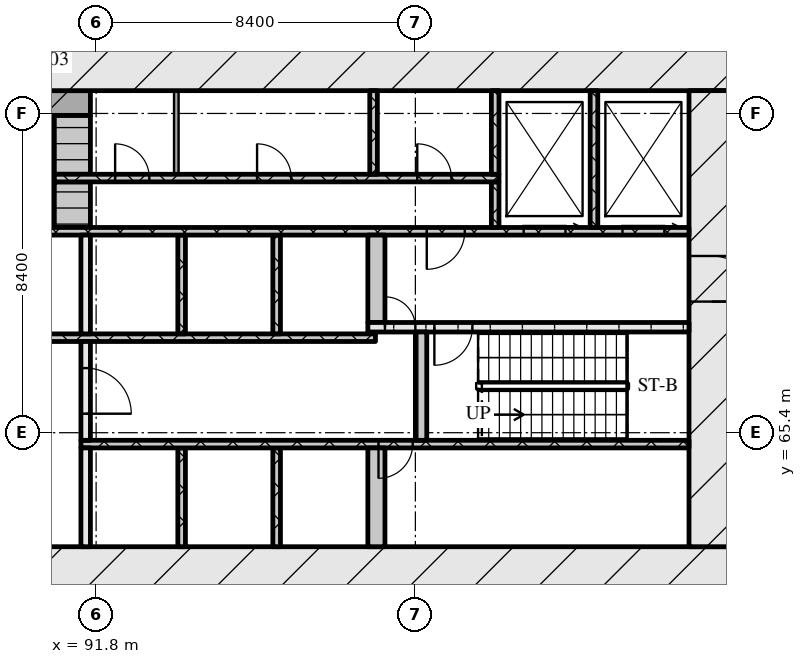
"""IFC4 building model, lengths in metres.
Left out: names, types, materials, properties, quantities, classifications, styles, units other than length and angle.
Written with IfcOpenShell. Run it as: python <this file> out.ifc"""

import sys

from ifc_helpers import new_model, si_unit, direction, frame, frame_2d, origin, place, context, subcontext, project, spatial, rectangle, extrude, element, fill, save


model = new_model("IFC4")
c1 = context("Model", 3, precision=1e-05, world=origin(), true_north=direction((0.0, 1.0)))
c2 = subcontext(c1, "Body", "Model", "MODEL_VIEW")
j1 = project(units=[si_unit("LENGTHUNIT", "METRE"), si_unit("PLANEANGLEUNIT", "RADIAN")], contexts=[c1])
p1 = place(None, origin())
s1 = spatial("IfcSite", under=j1, at=p1, CompositionType="ELEMENT")
p2 = place(p1, origin())
s2 = spatial("IfcBuilding", under=s1, at=p2, CompositionType="ELEMENT")
p3 = place(p2, frame((0.0, 0.0, 9.0)))
s3 = spatial("IfcBuildingStorey", under=s2, at=p3, CompositionType="ELEMENT", Elevation=9.0)
p4 = place(p3, frame((66.6, 61.8, 0.0), z_axis=(0.0, 0.0, 1.0), x_axis=(1.0, 0.0, 0.0)))
e1 = element("IfcWall", 1, at=p4, inside=s3, PredefinedType="SOLIDWALL", context=c2, shape_type="SweptSolid", body=[
    extrude(rectangle(XDim=42.0, YDim=1.2, at=frame_2d((21.0, 0.0))), origin(), (0.0, 0.0, 1.0), 5.1),
])
p5 = place(p4, frame((21.35, 0.0, 0.0)))
e2 = element("IfcOpeningElement", 2, at=p5, cuts=e1, PredefinedType="OPENING", context=c2, shape_type="SweptSolid", body=[
    extrude(rectangle(XDim=1.8, YDim=2.1, at=frame_2d((0.9, 1.05))), frame((0.0, 0.61, 0.0), z_axis=(0.0, -1.0, 0.0), x_axis=(1.0, 0.0, 0.0)), (0.0, 0.0, 1.0), 1.22),
])
p6 = place(p3, frame((66.6, 75.0, 0.0), z_axis=(0.0, 0.0, 1.0), x_axis=(1.0, 0.0, 0.0)))
e3 = element("IfcWall", 3, at=p6, inside=s3, PredefinedType="SOLIDWALL", context=c2, shape_type="SweptSolid", body=[
    extrude(rectangle(XDim=42.0, YDim=1.2, at=frame_2d((21.0, 0.0))), origin(), (0.0, 0.0, 1.0), 5.1),
])
p7 = place(p3, frame((108.0, 62.4, 0.0), z_axis=(0.0, 0.0, 1.0), x_axis=(0.0, 1.0, 0.0)))
e4 = element("IfcWall", 4, at=p7, inside=s3, PredefinedType="SOLIDWALL", context=c2, shape_type="SweptSolid", body=[
    extrude(rectangle(XDim=12.0, YDim=1.2, at=frame_2d((6.0, 0.0))), origin(), (0.0, 0.0, 1.0), 5.1),
])
p8 = place(p7, frame((6.45, 0.0, 0.0)))
e5 = element("IfcOpeningElement", 5, at=p8, cuts=e4, PredefinedType="OPENING", context=c2, shape_type="SweptSolid", body=[
    extrude(rectangle(XDim=1.2, YDim=2.1, at=frame_2d((0.6, 1.05))), frame((0.0, 0.61, 0.0), z_axis=(0.0, -1.0, 0.0), x_axis=(1.0, 0.0, 0.0)), (0.0, 0.0, 1.0), 1.22),
])
p9 = place(p3, frame((91.525, 62.4, 0.0), z_axis=(0.0, 0.0, 1.0), x_axis=(0.0, 1.0, 0.0)))
e6 = element("IfcWall", 6, at=p9, inside=s3, PredefinedType="SOLIDWALL", context=c2, shape_type="SweptSolid", body=[
    extrude(rectangle(XDim=2.6, YDim=0.25, at=frame_2d((1.3, 0.0))), origin(), (0.0, 0.0, 1.0), 5.1),
])
for number, where, z_axis, x_axis in (
    (7, (94.05, 62.4, 0.0), (0.0, 0.0, 1.0), (0.0, 1.0, 0.0)),
    (8, (96.55, 62.4, 0.0), (0.0, 0.0, 1.0), (0.0, 1.0, 0.0)),
):
    element("IfcWall", number, at=place(p3, frame(where, z_axis=z_axis, x_axis=x_axis)), inside=s3, PredefinedType="SOLIDWALL", context=c2, shape_type="SweptSolid", body=[
        extrude(rectangle(XDim=2.6, YDim=0.2, at=frame_2d((1.3, 0.0))), origin(), (0.0, 0.0, 1.0), 5.1),
    ])
p10 = place(p3, frame((99.175, 62.4, 0.0), z_axis=(0.0, 0.0, 1.0), x_axis=(0.0, 1.0, 0.0)))
e9 = element("IfcWall", 9, at=p10, inside=s3, PredefinedType="SOLIDWALL", context=c2, shape_type="SweptSolid", body=[
    extrude(rectangle(XDim=2.6, YDim=0.45, at=frame_2d((1.3, 0.0))), origin(), (0.0, 0.0, 1.0), 5.1),
])
p11 = place(p3, frame((91.4, 65.1, 0.0), z_axis=(0.0, 0.0, 1.0), x_axis=(1.0, 0.0, 0.0)))
e10 = element("IfcWall", 10, at=p11, inside=s3, PredefinedType="SOLIDWALL", context=c2, shape_type="SweptSolid", body=[
    extrude(rectangle(XDim=16.0, YDim=0.2, at=frame_2d((8.0, 0.0))), origin(), (0.0, 0.0, 1.0), 5.1),
])
p12 = place(p11, frame((7.83, 0.0, 0.0)))
e11 = element("IfcOpeningElement", 11, at=p12, cuts=e10, PredefinedType="OPENING", context=c2, shape_type="SweptSolid", body=[
    extrude(rectangle(XDim=0.9, YDim=2.1, at=frame_2d((0.45, 1.05))), frame((0.0, 0.11, 0.0), z_axis=(0.0, -1.0, 0.0), x_axis=(1.0, 0.0, 0.0)), (0.0, 0.0, 1.0), 0.22),
])
p13 = place(p3, frame((91.525, 65.2, 0.0), z_axis=(0.0, 0.0, 1.0), x_axis=(0.0, 1.0, 0.0)))
e12 = element("IfcWall", 12, at=p13, inside=s3, PredefinedType="SOLIDWALL", context=c2, shape_type="SweptSolid", body=[
    extrude(rectangle(XDim=2.6, YDim=0.25, at=frame_2d((1.3, 0.0))), origin(), (0.0, 0.0, 1.0), 5.1),
])
p14 = place(p13, frame((0.7, 0.0, 0.0)))
e13 = element("IfcOpeningElement", 13, at=p14, cuts=e12, PredefinedType="OPENING", context=c2, shape_type="SweptSolid", body=[
    extrude(rectangle(XDim=1.2, YDim=2.1, at=frame_2d((0.6, 1.05))), frame((0.0, 0.135, 0.0), z_axis=(0.0, -1.0, 0.0), x_axis=(1.0, 0.0, 0.0)), (0.0, 0.0, 1.0), 0.27),
])
p15 = place(p3, frame((100.35, 65.2, 0.0), z_axis=(0.0, 0.0, 1.0), x_axis=(0.0, 1.0, 0.0)))
e14 = element("IfcWall", 14, at=p15, inside=s3, PredefinedType="SOLIDWALL", context=c2, shape_type="SweptSolid", body=[
    extrude(rectangle(XDim=2.85, YDim=0.3, at=frame_2d((1.425, 0.0))), origin(), (0.0, 0.0, 1.0), 5.1),
])
p16 = place(p3, frame((76.05, 67.9, 0.0), z_axis=(0.0, 0.0, 1.0), x_axis=(1.0, 0.0, 0.0)))
e15 = element("IfcWall", 15, at=p16, inside=s3, PredefinedType="SOLIDWALL", context=c2, shape_type="SweptSolid", body=[
    extrude(rectangle(XDim=23.1, YDim=0.2, at=frame_2d((11.55, 0.0))), origin(), (0.0, 0.0, 1.0), 5.1),
])
p17 = place(p16, frame((8.35, 0.0, 0.0)))
e16 = element("IfcOpeningElement", 16, at=p17, cuts=e15, PredefinedType="OPENING", context=c2, shape_type="SweptSolid", body=[
    extrude(rectangle(XDim=1.1, YDim=2.1, at=frame_2d((0.55, 1.05))), frame((0.0, 0.11, 0.0), z_axis=(0.0, -1.0, 0.0), x_axis=(1.0, 0.0, 0.0)), (0.0, 0.0, 1.0), 0.22),
])
p18 = place(p16, frame((10.85, 0.0, 0.0)))
e17 = element("IfcOpeningElement", 17, at=p18, cuts=e15, PredefinedType="OPENING", context=c2, shape_type="SweptSolid", body=[
    extrude(rectangle(XDim=1.1, YDim=2.1, at=frame_2d((0.55, 1.05))), frame((0.0, 0.11, 0.0), z_axis=(0.0, -1.0, 0.0), x_axis=(1.0, 0.0, 0.0)), (0.0, 0.0, 1.0), 0.22),
])
p19 = place(p16, frame((13.55, 0.0, 0.0)))
e18 = element("IfcOpeningElement", 18, at=p19, cuts=e15, PredefinedType="OPENING", context=c2, shape_type="SweptSolid", body=[
    extrude(rectangle(XDim=1.0, YDim=2.1, at=frame_2d((0.5, 1.05))), frame((0.0, 0.11, 0.0), z_axis=(0.0, -1.0, 0.0), x_axis=(1.0, 0.0, 0.0)), (0.0, 0.0, 1.0), 0.22),
])
p20 = place(p3, frame((91.525, 68.0, 0.0), z_axis=(0.0, 0.0, 1.0), x_axis=(0.0, 1.0, 0.0)))
e19 = element("IfcWall", 19, at=p20, inside=s3, PredefinedType="SOLIDWALL", context=c2, shape_type="SweptSolid", body=[
    extrude(rectangle(XDim=2.6, YDim=0.25, at=frame_2d((1.3, 0.0))), origin(), (0.0, 0.0, 1.0), 5.1),
])
for number, where, z_axis, x_axis in (
    (20, (94.05, 68.0, 0.0), (0.0, 0.0, 1.0), (0.0, 1.0, 0.0)),
    (21, (96.55, 68.0, 0.0), (0.0, 0.0, 1.0), (0.0, 1.0, 0.0)),
):
    element("IfcWall", number, at=place(p3, frame(where, z_axis=z_axis, x_axis=x_axis)), inside=s3, PredefinedType="SOLIDWALL", context=c2, shape_type="SweptSolid", body=[
        extrude(rectangle(XDim=2.6, YDim=0.2, at=frame_2d((1.3, 0.0))), origin(), (0.0, 0.0, 1.0), 5.1),
    ])
p21 = place(p3, frame((98.95, 68.025, 0.0), z_axis=(0.0, 0.0, 1.0), x_axis=(1.0, 0.0, 0.0)))
e22 = element("IfcWall", 22, at=p21, inside=s3, PredefinedType="SOLIDWALL", context=c2, shape_type="SweptSolid", body=[
    extrude(rectangle(XDim=0.2, YDim=0.05, at=frame_2d((0.1, 0.0))), origin(), (0.0, 0.0, 1.0), 5.1),
])
p22 = place(p3, frame((98.95, 68.175, 0.0), z_axis=(0.0, 0.0, 1.0), x_axis=(1.0, 0.0, 0.0)))
e23 = element("IfcWall", 23, at=p22, inside=s3, PredefinedType="SOLIDWALL", context=c2, shape_type="SweptSolid", body=[
    extrude(rectangle(XDim=8.45, YDim=0.25, at=frame_2d((4.225, 0.0))), origin(), (0.0, 0.0, 1.0), 5.1),
])
p23 = place(p22, frame((0.45, 0.0, 0.0)))
e24 = element("IfcOpeningElement", 24, at=p23, cuts=e23, PredefinedType="OPENING", context=c2, shape_type="SweptSolid", body=[
    extrude(rectangle(XDim=0.8, YDim=2.1, at=frame_2d((0.4, 1.05))), frame((0.0, 0.135, 0.0), z_axis=(0.0, -1.0, 0.0), x_axis=(1.0, 0.0, 0.0)), (0.0, 0.0, 1.0), 0.27),
])
p24 = place(p22, frame((1.75, 0.0, 0.0)))
e25 = element("IfcOpeningElement", 25, at=p24, cuts=e23, PredefinedType="OPENING", context=c2, shape_type="SweptSolid", body=[
    extrude(rectangle(XDim=1.0, YDim=2.1, at=frame_2d((0.5, 1.05))), frame((0.0, 0.135, 0.0), z_axis=(0.0, -1.0, 0.0), x_axis=(1.0, 0.0, 0.0)), (0.0, 0.0, 1.0), 0.27),
])
p25 = place(p3, frame((99.175, 68.3, 0.0), z_axis=(0.0, 0.0, 1.0), x_axis=(0.0, 1.0, 0.0)))
e26 = element("IfcWall", 26, at=p25, inside=s3, PredefinedType="SOLIDWALL", context=c2, shape_type="SweptSolid", body=[
    extrude(rectangle(XDim=2.3, YDim=0.45, at=frame_2d((1.15, 0.0))), origin(), (0.0, 0.0, 1.0), 5.1),
])
p26 = place(p3, frame((67.8, 70.7, 0.0), z_axis=(0.0, 0.0, 1.0), x_axis=(1.0, 0.0, 0.0)))
e27 = element("IfcWall", 27, at=p26, inside=s3, PredefinedType="SOLIDWALL", context=c2, shape_type="SweptSolid", body=[
    extrude(rectangle(XDim=39.6, YDim=0.2, at=frame_2d((19.8, 0.0))), origin(), (0.0, 0.0, 1.0), 5.1),
])
p27 = place(p26, frame((0.65, 0.0, 0.0)))
e28 = element("IfcOpeningElement", 28, at=p27, cuts=e27, PredefinedType="OPENING", context=c2, shape_type="SweptSolid", body=[
    extrude(rectangle(XDim=1.1, YDim=2.1, at=frame_2d((0.55, 1.05))), frame((0.0, 0.11, 0.0), z_axis=(0.0, -1.0, 0.0), x_axis=(1.0, 0.0, 0.0)), (0.0, 0.0, 1.0), 0.22),
])
p28 = place(p26, frame((3.25, 0.0, 0.0)))
e29 = element("IfcOpeningElement", 29, at=p28, cuts=e27, PredefinedType="OPENING", context=c2, shape_type="SweptSolid", body=[
    extrude(rectangle(XDim=1.1, YDim=2.1, at=frame_2d((0.55, 1.05))), frame((0.0, 0.11, 0.0), z_axis=(0.0, -1.0, 0.0), x_axis=(1.0, 0.0, 0.0)), (0.0, 0.0, 1.0), 0.22),
])
p29 = place(p26, frame((5.9, 0.0, 0.0)))
e30 = element("IfcOpeningElement", 30, at=p29, cuts=e27, PredefinedType="OPENING", context=c2, shape_type="SweptSolid", body=[
    extrude(rectangle(XDim=1.0, YDim=2.1, at=frame_2d((0.5, 1.05))), frame((0.0, 0.11, 0.0), z_axis=(0.0, -1.0, 0.0), x_axis=(1.0, 0.0, 0.0)), (0.0, 0.0, 1.0), 0.22),
])
p30 = place(p26, frame((21.7, 0.0, 0.0)))
e31 = element("IfcOpeningElement", 31, at=p30, cuts=e27, PredefinedType="OPENING", context=c2, shape_type="SweptSolid", body=[
    extrude(rectangle(XDim=1.0, YDim=2.1, at=frame_2d((0.5, 1.05))), frame((0.0, 0.11, 0.0), z_axis=(0.0, -1.0, 0.0), x_axis=(1.0, 0.0, 0.0)), (0.0, 0.0, 1.0), 0.22),
])
p31 = place(p26, frame((32.7, 0.0, 0.0)))
e32 = element("IfcOpeningElement", 32, at=p31, cuts=e27, PredefinedType="OPENING", context=c2, shape_type="SweptSolid", body=[
    extrude(rectangle(XDim=1.0, YDim=2.1, at=frame_2d((0.5, 1.05))), frame((0.0, 0.11, 0.0), z_axis=(0.0, -1.0, 0.0), x_axis=(1.0, 0.0, 0.0)), (0.0, 0.0, 1.0), 0.22),
])
p32 = place(p26, frame((35.25, 0.0, 0.0)))
e33 = element("IfcOpeningElement", 33, at=p32, cuts=e27, PredefinedType="OPENING", context=c2, shape_type="SweptSolid", body=[
    extrude(rectangle(XDim=1.1, YDim=2.1, at=frame_2d((0.55, 1.05))), frame((0.0, 0.11, 0.0), z_axis=(0.0, -1.0, 0.0), x_axis=(1.0, 0.0, 0.0)), (0.0, 0.0, 1.0), 0.22),
])
p33 = place(p26, frame((37.85, 0.0, 0.0)))
e34 = element("IfcOpeningElement", 34, at=p33, cuts=e27, PredefinedType="OPENING", context=c2, shape_type="SweptSolid", body=[
    extrude(rectangle(XDim=1.1, YDim=2.1, at=frame_2d((0.55, 1.05))), frame((0.0, 0.11, 0.0), z_axis=(0.0, -1.0, 0.0), x_axis=(1.0, 0.0, 0.0)), (0.0, 0.0, 1.0), 0.22),
])
p34 = place(p3, frame((91.175, 70.8, 0.0), z_axis=(0.0, 0.0, 1.0), x_axis=(0.0, 1.0, 0.0)))
e35 = element("IfcWall", 35, at=p34, inside=s3, PredefinedType="SOLIDWALL", context=c2, shape_type="SweptSolid", body=[
    extrude(rectangle(XDim=1.2, YDim=0.95, at=frame_2d((0.6, 0.0))), origin(), (0.0, 0.0, 1.0), 5.1),
])
p35 = place(p3, frame((102.3, 70.8, 0.0), z_axis=(0.0, 0.0, 1.0), x_axis=(0.0, 1.0, 0.0)))
e36 = element("IfcWall", 36, at=p35, inside=s3, PredefinedType="SOLIDWALL", context=c2, shape_type="SweptSolid", body=[
    extrude(rectangle(XDim=1.2, YDim=0.2, at=frame_2d((0.6, 0.0))), origin(), (0.0, 0.0, 1.0), 5.1),
])
p36 = place(p3, frame((104.9, 70.8, 0.0), z_axis=(0.0, 0.0, 1.0), x_axis=(0.0, 1.0, 0.0)))
e37 = element("IfcWall", 37, at=p36, inside=s3, PredefinedType="SOLIDWALL", context=c2, shape_type="SweptSolid", body=[
    extrude(rectangle(XDim=3.6, YDim=0.2, at=frame_2d((1.8, 0.0))), origin(), (0.0, 0.0, 1.0), 5.1),
])
p37 = place(p3, frame((90.7, 72.1, 0.0), z_axis=(0.0, 0.0, 1.0), x_axis=(1.0, 0.0, 0.0)))
e38 = element("IfcWall", 38, at=p37, inside=s3, PredefinedType="SOLIDWALL", context=c2, shape_type="SweptSolid", body=[
    extrude(rectangle(XDim=11.7, YDim=0.2, at=frame_2d((5.85, 0.0))), origin(), (0.0, 0.0, 1.0), 5.1),
])
p38 = place(p37, frame((1.6, 0.0, 0.0)))
e39 = element("IfcOpeningElement", 39, at=p38, cuts=e38, PredefinedType="OPENING", context=c2, shape_type="SweptSolid", body=[
    extrude(rectangle(XDim=0.9, YDim=2.1, at=frame_2d((0.45, 1.05))), frame((0.0, 0.11, 0.0), z_axis=(0.0, -1.0, 0.0), x_axis=(1.0, 0.0, 0.0)), (0.0, 0.0, 1.0), 0.22),
])
p39 = place(p37, frame((5.335, 0.0, 0.0)))
e40 = element("IfcOpeningElement", 40, at=p39, cuts=e38, PredefinedType="OPENING", context=c2, shape_type="SweptSolid", body=[
    extrude(rectangle(XDim=0.9, YDim=2.1, at=frame_2d((0.45, 1.05))), frame((0.0, 0.11, 0.0), z_axis=(0.0, -1.0, 0.0), x_axis=(1.0, 0.0, 0.0)), (0.0, 0.0, 1.0), 0.22),
])
p40 = place(p37, frame((9.55, 0.0, 0.0)))
e41 = element("IfcOpeningElement", 41, at=p40, cuts=e38, PredefinedType="OPENING", context=c2, shape_type="SweptSolid", body=[
    extrude(rectangle(XDim=0.9, YDim=2.1, at=frame_2d((0.45, 1.05))), frame((0.0, 0.11, 0.0), z_axis=(0.0, -1.0, 0.0), x_axis=(1.0, 0.0, 0.0)), (0.0, 0.0, 1.0), 0.22),
])
p41 = place(p3, frame((91.175, 72.2, 0.0), z_axis=(0.0, 0.0, 1.0), x_axis=(0.0, 1.0, 0.0)))
e42 = element("IfcWall", 42, at=p41, inside=s3, PredefinedType="SOLIDWALL", context=c2, shape_type="SweptSolid", body=[
    extrude(rectangle(XDim=1.55, YDim=0.95, at=frame_2d((0.775, 0.0))), origin(), (0.0, 0.0, 1.0), 5.1),
])
p42 = place(p3, frame((93.91, 72.2, 0.0), z_axis=(0.0, 0.0, 1.0), x_axis=(0.0, 1.0, 0.0)))
e43 = element("IfcWall", 43, at=p42, inside=s3, PredefinedType="PARTITIONING", context=c2, shape_type="SweptSolid", body=[
    extrude(rectangle(XDim=2.2, YDim=0.12, at=frame_2d((1.1, 0.0))), origin(), (0.0, 0.0, 1.0), 5.1),
])
for number, where, z_axis, x_axis in (
    (44, (99.1, 72.2, 0.0), (0.0, 0.0, 1.0), (0.0, 1.0, 0.0)),
    (45, (102.3, 72.2, 0.0), (0.0, 0.0, 1.0), (0.0, 1.0, 0.0)),
):
    element("IfcWall", number, at=place(p3, frame(where, z_axis=z_axis, x_axis=x_axis)), inside=s3, PredefinedType="SOLIDWALL", context=c2, shape_type="SweptSolid", body=[
        extrude(rectangle(XDim=2.2, YDim=0.2, at=frame_2d((1.1, 0.0))), origin(), (0.0, 0.0, 1.0), 5.1),
    ])
p43 = place(p3, frame((83.55, 74.075, 0.0), z_axis=(0.0, 0.0, 1.0), x_axis=(1.0, 0.0, 0.0)))
e46 = element("IfcWall", 46, at=p43, inside=s3, PredefinedType="SOLIDWALL", context=c2, shape_type="SweptSolid", body=[
    extrude(rectangle(XDim=8.1, YDim=0.65, at=frame_2d((4.05, 0.0))), origin(), (0.0, 0.0, 1.0), 5.1),
])
p44 = place(p12, origin())
e47 = element("IfcDoor", 47, at=p44, inside=s3, OperationType="SINGLE_SWING_RIGHT", PredefinedType="DOOR", context=c2, shape_type="SweptSolid", body=[
    extrude(rectangle(XDim=0.9, YDim=2.1, at=frame_2d((0.45, 1.05))), frame((0.0, 0.025, 0.0), z_axis=(0.0, -1.0, 0.0), x_axis=(1.0, 0.0, 0.0)), (0.0, 0.0, 1.0), 0.05),
])
fill(e11, e47)
p45 = place(p14, origin())
e48 = element("IfcDoor", 48, at=p45, inside=s3, OperationType="SINGLE_SWING_RIGHT", PredefinedType="DOOR", context=c2, shape_type="SweptSolid", body=[
    extrude(rectangle(XDim=1.2, YDim=2.1, at=frame_2d((0.6, 1.05))), frame((0.0, 0.025, 0.0), z_axis=(0.0, -1.0, 0.0), x_axis=(1.0, 0.0, 0.0)), (0.0, 0.0, 1.0), 0.05),
])
fill(e13, e48)
p46 = place(p23, origin())
e49 = element("IfcDoor", 49, at=p46, inside=s3, OperationType="SINGLE_SWING_LEFT", PredefinedType="DOOR", context=c2, shape_type="SweptSolid", body=[
    extrude(rectangle(XDim=0.8, YDim=2.1, at=frame_2d((0.4, 1.05))), frame((0.0, 0.025, 0.0), z_axis=(0.0, -1.0, 0.0), x_axis=(1.0, 0.0, 0.0)), (0.0, 0.0, 1.0), 0.05),
])
fill(e24, e49)
p47 = place(p24, origin())
e50 = element("IfcDoor", 50, at=p47, inside=s3, OperationType="SINGLE_SWING_RIGHT", PredefinedType="DOOR", context=c2, shape_type="SweptSolid", body=[
    extrude(rectangle(XDim=1.0, YDim=2.1, at=frame_2d((0.5, 1.05))), frame((0.0, 0.025, 0.0), z_axis=(0.0, -1.0, 0.0), x_axis=(1.0, 0.0, 0.0)), (0.0, 0.0, 1.0), 0.05),
])
fill(e25, e50)
p48 = place(p8, origin())
e51 = element("IfcDoor", 51, at=p48, inside=s3, OperationType="SINGLE_SWING_RIGHT", PredefinedType="DOOR", context=c2, shape_type="SweptSolid", body=[
    extrude(rectangle(XDim=1.2, YDim=2.1, at=frame_2d((0.6, 1.05))), frame((0.0, 0.025, 0.0), z_axis=(0.0, -1.0, 0.0), x_axis=(1.0, 0.0, 0.0)), (0.0, 0.0, 1.0), 0.05),
])
fill(e5, e51)
p49 = place(p31, origin())
e52 = element("IfcDoor", 52, at=p49, inside=s3, OperationType="SINGLE_SWING_RIGHT", PredefinedType="DOOR", context=c2, shape_type="SweptSolid", body=[
    extrude(rectangle(XDim=1.0, YDim=2.1, at=frame_2d((0.5, 1.05))), frame((0.0, 0.025, 0.0), z_axis=(0.0, -1.0, 0.0), x_axis=(1.0, 0.0, 0.0)), (0.0, 0.0, 1.0), 0.05),
])
fill(e32, e52)
p50 = place(p32, origin())
e53 = element("IfcDoor", 53, at=p50, inside=s3, OperationType="SLIDING_TO_RIGHT", PredefinedType="DOOR", context=c2, shape_type="SweptSolid", body=[
    extrude(rectangle(XDim=1.1, YDim=2.1, at=frame_2d((0.55, 1.05))), frame((0.0, 0.025, 0.0), z_axis=(0.0, -1.0, 0.0), x_axis=(1.0, 0.0, 0.0)), (0.0, 0.0, 1.0), 0.05),
])
fill(e33, e53)
p51 = place(p33, origin())
e54 = element("IfcDoor", 54, at=p51, inside=s3, OperationType="SLIDING_TO_RIGHT", PredefinedType="DOOR", context=c2, shape_type="SweptSolid", body=[
    extrude(rectangle(XDim=1.1, YDim=2.1, at=frame_2d((0.55, 1.05))), frame((0.0, 0.025, 0.0), z_axis=(0.0, -1.0, 0.0), x_axis=(1.0, 0.0, 0.0)), (0.0, 0.0, 1.0), 0.05),
])
fill(e34, e54)
p52 = place(p38, origin())
e55 = element("IfcDoor", 55, at=p52, inside=s3, OperationType="SINGLE_SWING_LEFT", PredefinedType="DOOR", context=c2, shape_type="SweptSolid", body=[
    extrude(rectangle(XDim=0.9, YDim=2.1, at=frame_2d((0.45, 1.05))), frame((0.0, 0.025, 0.0), z_axis=(0.0, -1.0, 0.0), x_axis=(1.0, 0.0, 0.0)), (0.0, 0.0, 1.0), 0.05),
])
fill(e39, e55)
p53 = place(p39, origin())
e56 = element("IfcDoor", 56, at=p53, inside=s3, OperationType="SINGLE_SWING_LEFT", PredefinedType="DOOR", context=c2, shape_type="SweptSolid", body=[
    extrude(rectangle(XDim=0.9, YDim=2.1, at=frame_2d((0.45, 1.05))), frame((0.0, 0.025, 0.0), z_axis=(0.0, -1.0, 0.0), x_axis=(1.0, 0.0, 0.0)), (0.0, 0.0, 1.0), 0.05),
])
fill(e40, e56)
p54 = place(p40, origin())
e57 = element("IfcDoor", 57, at=p54, inside=s3, OperationType="SINGLE_SWING_LEFT", PredefinedType="DOOR", context=c2, shape_type="SweptSolid", body=[
    extrude(rectangle(XDim=0.9, YDim=2.1, at=frame_2d((0.45, 1.05))), frame((0.0, 0.025, 0.0), z_axis=(0.0, -1.0, 0.0), x_axis=(1.0, 0.0, 0.0)), (0.0, 0.0, 1.0), 0.05),
])
fill(e41, e57)
save(model, sys.argv[1])
